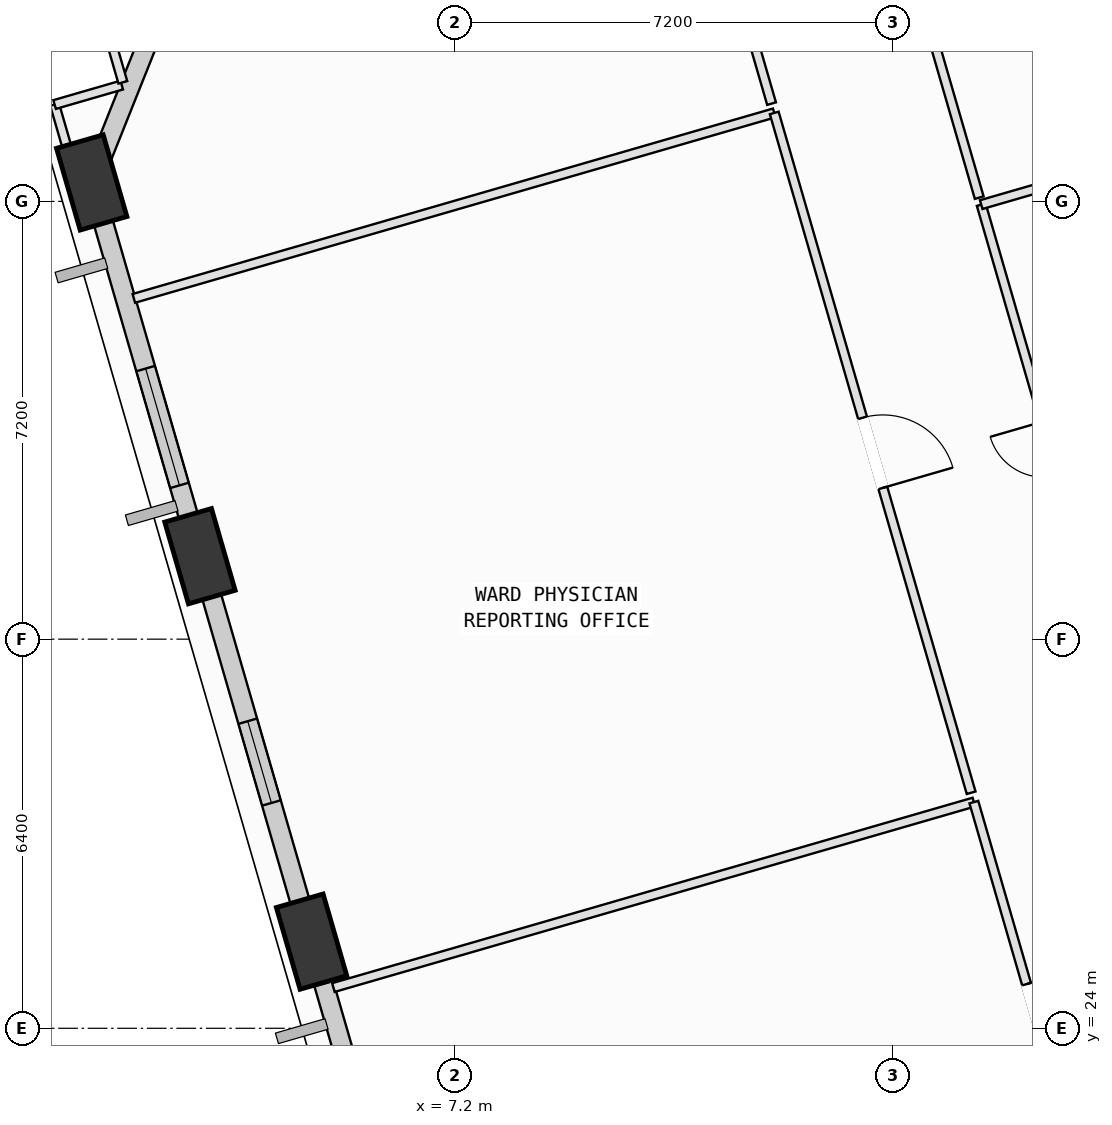
"""IFC4 building model, lengths in metres.
Left out: names, types, materials, properties, quantities, classifications, styles, units other than length and angle.
Written with IfcOpenShell. Run it as: python <this file> out.ifc"""

import sys

from ifc_helpers import new_model, si_unit, direction, frame, frame_2d, origin, origin_2d, place, context, subcontext, project, spatial, rectangle, extrude, element, fill, save


model = new_model("IFC4")
c1 = context("Model", 3, precision=1e-05, world=origin(), true_north=direction((0.0, 1.0)))
c2 = subcontext(c1, "Body", "Model", "MODEL_VIEW")
j1 = project(units=[si_unit("LENGTHUNIT", "METRE"), si_unit("PLANEANGLEUNIT", "RADIAN")], contexts=[c1])
p1 = place(None, origin())
s1 = spatial("IfcSite", under=j1, at=p1, CompositionType="ELEMENT")
p2 = place(p1, origin())
s2 = spatial("IfcBuilding", under=s1, at=p2, CompositionType="ELEMENT")
p3 = place(p2, frame((0.0, 0.0, 92.4)))
s3 = spatial("IfcBuildingStorey", under=s2, at=p3, CompositionType="ELEMENT", Elevation=92.4)
p4 = place(p3, frame((1.225, 37.912, 0.002), z_axis=(-0.052721586677, -0.133255019536, 0.989678500356), x_axis=(0.091085483074, 0.986283861971, 0.137650203007)))
e1 = element("IfcColumn", 1, at=p4, inside=s3, PredefinedType="COLUMN", context=c2, shape_type="SweptSolid", body=[
    extrude(rectangle(XDim=1.4, YDim=0.8, at=origin_2d()), origin(), (0.0, 0.0, 1.0), 4.038),
])
p5 = place(p3, frame((3.005, 31.765, 0.002), z_axis=(-0.027624773455, -0.126007738565, 0.991644554119), x_axis=(-0.067724849198, 0.989979682361, 0.123909536812)))
e2 = element("IfcColumn", 2, at=p5, inside=s3, PredefinedType="COLUMN", context=c2, shape_type="SweptSolid", body=[
    extrude(rectangle(XDim=1.4, YDim=0.8, at=origin_2d()), origin(), (0.0, 0.0, 1.0), 4.03),
])
p6 = place(p3, frame((4.841, 25.425, 0.002), z_axis=(-0.001577202956, -0.118350883349, 0.992970584077), x_axis=(-0.265418805981, 0.957406566821, 0.11369047119)))
e3 = element("IfcColumn", 3, at=p6, inside=s3, PredefinedType="COLUMN", context=c2, shape_type="SweptSolid", body=[
    extrude(rectangle(XDim=1.4, YDim=0.8, at=origin_2d()), origin(), (0.0, 0.0, 1.0), 4.025),
])
p7 = place(p3, frame((1.302, 38.104, 0.0), z_axis=(0.0, 0.0, 1.0), x_axis=(0.371011883007, 0.928628118607, 0.0)))
e4 = element("IfcWall", 4, at=p7, inside=s3, PredefinedType="SOLIDWALL", context=c2, shape_type="SweptSolid", body=[
    extrude(rectangle(XDim=3.89, YDim=0.32, at=frame_2d((1.945, 0.0))), origin(), (0.0, 0.0, 1.0), 3.165),
])
p8 = place(p3, frame((2.935, 32.007, 0.0), z_axis=(0.0, 0.0, 1.0), x_axis=(-0.278171081154, 0.960531545349, 0.0)))
e5 = element("IfcWall", 5, at=p8, inside=s3, PredefinedType="SOLIDWALL", context=c2, shape_type="SweptSolid", body=[
    extrude(rectangle(XDim=5.456, YDim=0.32, at=frame_2d((2.728, 0.0))), origin(), (0.0, 0.0, 1.0), 3.165),
])
p9 = place(p8, frame((0.96, 0.0, 0.75)))
e6 = element("IfcOpeningElement", 6, at=p9, cuts=e5, PredefinedType="OPENING", context=c2, shape_type="SweptSolid", body=[
    extrude(rectangle(XDim=2.0, YDim=1.95, at=frame_2d((1.0, 0.975))), frame((0.0, 0.17, 0.0), z_axis=(0.0, -1.0, 0.0), x_axis=(1.0, 0.0, 0.0)), (0.0, 0.0, 1.0), 0.34),
])
p10 = place(p3, frame((4.768, 25.678, 0.0), z_axis=(0.0, 0.0, 1.0), x_axis=(-0.278117063401, 0.960547187308, 0.0)))
e7 = element("IfcWall", 7, at=p10, inside=s3, PredefinedType="SOLIDWALL", context=c2, shape_type="SweptSolid", body=[
    extrude(rectangle(XDim=5.628, YDim=0.32, at=frame_2d((2.814, 0.0))), origin(), (0.0, 0.0, 1.0), 3.165),
])
p11 = place(p10, frame((2.111, 0.0, 0.75)))
e8 = element("IfcOpeningElement", 8, at=p11, cuts=e7, PredefinedType="OPENING", context=c2, shape_type="SweptSolid", body=[
    extrude(rectangle(XDim=1.4, YDim=1.85, at=frame_2d((0.7, 0.925))), frame((0.0, 0.17, 0.0), z_axis=(0.0, -1.0, 0.0), x_axis=(1.0, 0.0, 0.0)), (0.0, 0.0, 1.0), 0.34),
])
p12 = place(p3, frame((6.616, 19.295, 0.0), z_axis=(0.0, 0.0, 1.0), x_axis=(-0.278153347747, 0.960536680787, 0.0)))
e9 = element("IfcWall", 9, at=p12, inside=s3, PredefinedType="SOLIDWALL", context=c2, shape_type="SweptSolid", body=[
    extrude(rectangle(XDim=5.662, YDim=0.32, at=frame_2d((2.831, 0.0))), origin(), (0.0, 0.0, 1.0), 3.165),
])
p13 = place(p12, frame((1.773, 0.0, 0.75)))
e10 = element("IfcOpeningElement", 10, at=p13, cuts=e9, PredefinedType="OPENING", context=c2, shape_type="SweptSolid", body=[
    extrude(rectangle(XDim=1.8, YDim=2.05, at=frame_2d((0.9, 1.025))), frame((0.0, 0.17, 0.0), z_axis=(0.0, -1.0, 0.0), x_axis=(1.0, 0.0, 0.0)), (0.0, 0.0, 1.0), 0.34),
])
p14 = place(p3, frame((5.2, 24.67, 0.0), z_axis=(0.0, 0.0, 1.0), x_axis=(0.960539065788, 0.27814511158, 0.0)))
e11 = element("IfcWall", 11, at=p14, inside=s3, PredefinedType="PARTITIONING", context=c2, shape_type="SweptSolid", body=[
    extrude(rectangle(XDim=10.966, YDim=0.15, at=frame_2d((5.483, 0.0))), origin(), (0.0, 0.0, 1.0), 3.78),
])
p15 = place(p3, frame((15.733, 27.72, 0.0), z_axis=(0.0, 0.0, 1.0), x_axis=(0.278098749545, -0.960552489717, 0.0)))
e12 = element("IfcWall", 12, at=p15, inside=s3, PredefinedType="PARTITIONING", context=c2, shape_type="SweptSolid", body=[
    extrude(rectangle(XDim=7.433, YDim=0.15, at=frame_2d((3.717, 0.0))), origin(), (0.0, 0.0, 1.0), 3.78),
])
p16 = place(p15, frame((3.117, 0.0, 0.0)))
e13 = element("IfcOpeningElement", 13, at=p16, cuts=e12, PredefinedType="OPENING", context=c2, shape_type="SweptSolid", body=[
    extrude(rectangle(XDim=1.2, YDim=2.15, at=frame_2d((0.6, 1.075))), frame((0.0, 0.085, 0.0), z_axis=(0.0, -1.0, 0.0), x_axis=(1.0, 0.0, 0.0)), (0.0, 0.0, 1.0), 0.17),
])
p17 = place(p3, frame((1.918, 36.005, 0.0), z_axis=(0.0, 0.0, 1.0), x_axis=(0.960532175089, 0.278168906636, 0.0)))
e14 = element("IfcWall", 14, at=p17, inside=s3, PredefinedType="PARTITIONING", context=c2, shape_type="SweptSolid", body=[
    extrude(rectangle(XDim=10.965, YDim=0.15, at=frame_2d((5.482, 0.0))), origin(), (0.0, 0.0, 1.0), 3.78),
])
p18 = place(p3, frame((12.45, 39.055, 0.0), z_axis=(0.0, 0.0, 1.0), x_axis=(0.278173677599, -0.960530793411, 0.0)))
e15 = element("IfcWall", 15, at=p18, inside=s3, PredefinedType="PARTITIONING", context=c2, shape_type="SweptSolid", body=[
    extrude(rectangle(XDim=11.64, YDim=0.15, at=frame_2d((5.82, 0.0))), origin(), (0.0, 0.0, 1.0), 3.78),
])
p19 = place(p18, frame((5.22, 0.0, 0.0)))
e16 = element("IfcOpeningElement", 16, at=p19, cuts=e15, PredefinedType="OPENING", context=c2, shape_type="SweptSolid", body=[
    extrude(rectangle(XDim=1.2, YDim=2.15, at=frame_2d((0.6, 1.075))), frame((0.0, 0.085, 0.0), z_axis=(0.0, -1.0, 0.0), x_axis=(1.0, 0.0, 0.0)), (0.0, 0.0, 1.0), 0.17),
])
p20 = place(p3, frame((4.805, 24.723, 0.0), z_axis=(0.0, 0.0, 1.0), x_axis=(-0.277917486975, 0.960604950244, 0.0)))
e17 = element("IfcWall", 17, at=p20, inside=s3, PredefinedType="PARTITIONING", context=c2, shape_type="SweptSolid", body=[
    extrude(rectangle(XDim=0.928, YDim=0.15, at=frame_2d((0.464, 0.0))), origin(), (0.0, 0.0, 1.0), 3.165),
])
p21 = place(p3, frame((2.981, 31.02, 0.0), z_axis=(0.0, 0.0, 1.0), x_axis=(-0.277706408533, 0.960665993288, 0.0)))
e18 = element("IfcWall", 18, at=p21, inside=s3, PredefinedType="PARTITIONING", context=c2, shape_type="SweptSolid", body=[
    extrude(rectangle(XDim=0.961, YDim=0.15, at=frame_2d((0.48, 0.0))), origin(), (0.0, 0.0, 1.0), 3.165),
])
p22 = place(p3, frame((10.769, 44.861, 0.0), z_axis=(0.0, 0.0, 1.0), x_axis=(0.278143692162, -0.96053947681, 0.0)))
e19 = element("IfcWall", 19, at=p22, inside=s3, PredefinedType="PARTITIONING", context=c2, shape_type="SweptSolid", body=[
    extrude(rectangle(XDim=5.885, YDim=0.15, at=frame_2d((2.943, 0.0))), origin(), (0.0, 0.0, 1.0), 2.965),
])
p23 = place(p22, frame((2.343, 0.0, 0.0)))
e20 = element("IfcOpeningElement", 20, at=p23, cuts=e19, PredefinedType="OPENING", context=c2, shape_type="SweptSolid", body=[
    extrude(rectangle(XDim=1.2, YDim=2.15, at=frame_2d((0.6, 1.075))), frame((0.0, 0.085, 0.0), z_axis=(0.0, -1.0, 0.0), x_axis=(1.0, 0.0, 0.0)), (0.0, 0.0, 1.0), 0.17),
])
p24 = place(p3, frame((1.197, 37.183, 0.0), z_axis=(0.0, 0.0, 1.0), x_axis=(-0.278140228785, 0.960540479694, 0.0)))
e21 = element("IfcWall", 21, at=p24, inside=s3, PredefinedType="PARTITIONING", context=c2, shape_type="SweptSolid", body=[
    extrude(rectangle(XDim=2.093, YDim=0.15, at=frame_2d((1.046, 0.0))), origin(), (0.0, 0.0, 1.0), 3.165),
])
p25 = place(p3, frame((0.615, 39.193, 0.0), z_axis=(0.0, 0.0, 1.0), x_axis=(0.960507511892, 0.278254055855, 0.0)))
e22 = element("IfcWall", 22, at=p25, inside=s3, PredefinedType="PARTITIONING", context=c2, shape_type="SweptSolid", body=[
    extrude(rectangle(XDim=1.149, YDim=0.15, at=frame_2d((0.575, 0.0))), origin(), (0.0, 0.0, 1.0), 3.78),
])
p26 = place(p3, frame((1.737, 39.558, 0.0), z_axis=(0.0, 0.0, 1.0), x_axis=(-0.277830901588, 0.960629996472, 0.0)))
e23 = element("IfcWall", 23, at=p26, inside=s3, PredefinedType="PARTITIONING", context=c2, shape_type="SweptSolid", body=[
    extrude(rectangle(XDim=1.461, YDim=0.15, at=frame_2d((0.731, 0.0))), origin(), (0.0, 0.0, 1.0), 3.78),
])
p27 = place(p3, frame((18.174, 29.536, 0.0), z_axis=(0.0, 0.0, 1.0), x_axis=(-0.278171795837, 0.960531338375, 0.0)))
e24 = element("IfcWall", 24, at=p27, inside=s3, PredefinedType="PARTITIONING", context=c2, shape_type="SweptSolid", body=[
    extrude(rectangle(XDim=8.34, YDim=0.15, at=frame_2d((4.17, 0.0))), origin(), (0.0, 0.0, 1.0), 3.78),
])
p28 = place(p27, frame((3.71, 0.0, 0.0)))
e25 = element("IfcOpeningElement", 25, at=p28, cuts=e24, PredefinedType="OPENING", context=c2, shape_type="SweptSolid", body=[
    extrude(rectangle(XDim=0.92, YDim=2.1, at=frame_2d((0.46, 1.05))), frame((0.0, 0.085, 0.0), z_axis=(0.0, -1.0, 0.0), x_axis=(1.0, 0.0, 0.0)), (0.0, 0.0, 1.0), 0.17),
])
p29 = place(p3, frame((15.854, 37.547, 0.0), z_axis=(0.0, 0.0, 1.0), x_axis=(0.960519935436, 0.278211167335, 0.0)))
e26 = element("IfcWall", 26, at=p29, inside=s3, PredefinedType="PARTITIONING", context=c2, shape_type="SweptSolid", body=[
    extrude(rectangle(XDim=6.815, YDim=0.15, at=frame_2d((3.407, 0.0))), origin(), (0.0, 0.0, 1.0), 3.78),
])
p30 = place(p3, frame((15.821, 37.662, 0.0), z_axis=(0.0, 0.0, 1.0), x_axis=(-0.278211165239, 0.960519936043, 0.0)))
e27 = element("IfcWall", 27, at=p30, inside=s3, PredefinedType="PARTITIONING", context=c2, shape_type="SweptSolid", body=[
    extrude(rectangle(XDim=8.015, YDim=0.15, at=frame_2d((4.008, 0.0))), origin(), (0.0, 0.0, 1.0), 3.78),
])
p31 = place(p30, frame((3.548, 0.0, 0.0)))
e28 = element("IfcOpeningElement", 28, at=p31, cuts=e27, PredefinedType="OPENING", context=c2, shape_type="SweptSolid", body=[
    extrude(rectangle(XDim=0.92, YDim=2.1, at=frame_2d((0.46, 1.05))), frame((0.0, 0.085, 0.0), z_axis=(0.0, -1.0, 0.0), x_axis=(1.0, 0.0, 0.0)), (0.0, 0.0, 1.0), 0.17),
])
p32 = place(p9, origin())
e29 = element("IfcWindow", 29, at=p32, inside=s3, PartitioningType="SINGLE_PANEL", PredefinedType="WINDOW", context=c2, shape_type="SweptSolid", body=[
    extrude(rectangle(XDim=2.0, YDim=1.95, at=frame_2d((1.0, 0.975))), frame((0.0, 0.03, 0.0), z_axis=(0.0, -1.0, 0.0), x_axis=(1.0, 0.0, 0.0)), (0.0, 0.0, 1.0), 0.06),
])
fill(e6, e29)
p33 = place(p11, origin())
e30 = element("IfcWindow", 30, at=p33, inside=s3, PartitioningType="SINGLE_PANEL", PredefinedType="WINDOW", context=c2, shape_type="SweptSolid", body=[
    extrude(rectangle(XDim=1.4, YDim=1.85, at=frame_2d((0.7, 0.925))), frame((0.0, 0.03, 0.0), z_axis=(0.0, -1.0, 0.0), x_axis=(1.0, 0.0, 0.0)), (0.0, 0.0, 1.0), 0.06),
])
fill(e8, e30)
p34 = place(p16, origin())
e31 = element("IfcDoor", 31, at=p34, inside=s3, OperationType="SINGLE_SWING_LEFT", PredefinedType="DOOR", context=c2, shape_type="SweptSolid", body=[
    extrude(rectangle(XDim=1.2, YDim=2.15, at=frame_2d((0.6, 1.075))), frame((0.0, 0.025, 0.0), z_axis=(0.0, -1.0, 0.0), x_axis=(1.0, 0.0, 0.0)), (0.0, 0.0, 1.0), 0.05),
])
fill(e13, e31)
p35 = place(p19, origin())
e32 = element("IfcDoor", 32, at=p35, inside=s3, OperationType="SINGLE_SWING_RIGHT", PredefinedType="DOOR", context=c2, shape_type="SweptSolid", body=[
    extrude(rectangle(XDim=1.2, YDim=2.15, at=frame_2d((0.6, 1.075))), frame((0.0, 0.025, 0.0), z_axis=(0.0, -1.0, 0.0), x_axis=(1.0, 0.0, 0.0)), (0.0, 0.0, 1.0), 0.05),
])
fill(e16, e32)
save(model, sys.argv[1])
